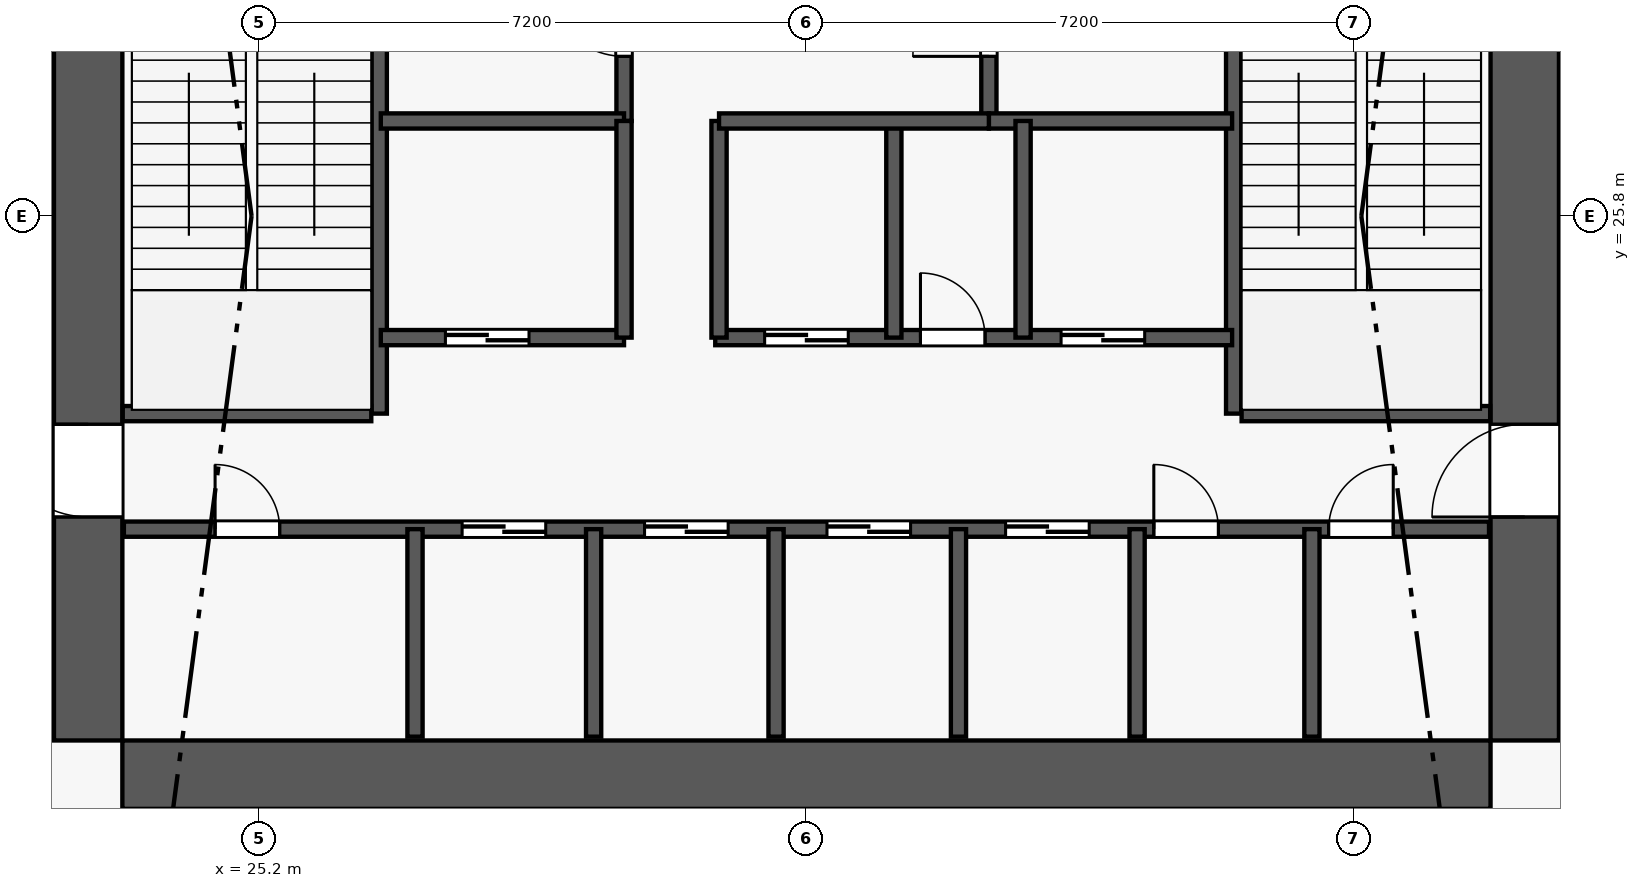
"""IFC4 building model, lengths in metres.
Left out: names, types, materials, properties, quantities, classifications, styles, units other than length and angle.
Written with IfcOpenShell. Run it as: python <this file> out.ifc"""

import sys

from ifc_helpers import new_model, si_unit, direction, frame, frame_2d, origin, origin_2d, place, context, subcontext, project, spatial, rectangle, extrude, element, fill, save


model = new_model("IFC4")
c1 = context("Model", 3, precision=1e-05, world=origin(), true_north=direction((0.0, 1.0)))
c2 = subcontext(c1, "Body", "Model", "MODEL_VIEW")
j1 = project(units=[si_unit("LENGTHUNIT", "METRE"), si_unit("PLANEANGLEUNIT", "RADIAN")], contexts=[c1])
p1 = place(None, origin())
s1 = spatial("IfcSite", under=j1, at=p1, CompositionType="ELEMENT")
p2 = place(p1, origin())
s2 = spatial("IfcBuilding", under=s1, at=p2, CompositionType="ELEMENT")
p3 = place(p2, frame((0.0, 0.0, -4.8)))
s3 = spatial("IfcBuildingStorey", under=s2, at=p3, CompositionType="ELEMENT", Elevation=-4.8)
for number, where, z_axis, x_axis in (
    (1, (22.95, 18.45, 0.0), (0.0, 0.0, 1.0), (1.0, 0.0, 0.0)),
    (2, (41.85, 18.45, 0.0), (0.0, 0.0, 1.0), (1.0, 0.0, 0.0)),
):
    element("IfcColumn", number, at=place(p3, frame(where, z_axis=z_axis, x_axis=x_axis)), inside=s3, PredefinedType="COLUMN", context=c2, shape_type="SweptSolid", body=[
        extrude(rectangle(XDim=0.9, YDim=0.9, at=origin_2d()), origin(), (0.0, 0.0, 1.0), 4.8),
    ])
p4 = place(p3, frame((23.4, 18.45, 0.0), z_axis=(0.0, 0.0, 1.0), x_axis=(1.0, 0.0, 0.0)))
e3 = element("IfcWall", 3, at=p4, inside=s3, PredefinedType="SHEAR", context=c2, shape_type="SweptSolid", body=[
    extrude(rectangle(XDim=18.0, YDim=0.9, at=frame_2d((9.0, 0.0))), origin(), (0.0, 0.0, 1.0), 4.55),
])
p5 = place(p3, frame((22.95, 18.9, 0.0), z_axis=(0.0, 0.0, 1.0), x_axis=(0.0, 1.0, 0.0)))
e4 = element("IfcWall", 4, at=p5, inside=s3, PredefinedType="SHEAR", context=c2, shape_type="SweptSolid", body=[
    extrude(rectangle(XDim=14.0, YDim=0.9, at=frame_2d((7.0, 0.0))), origin(), (0.0, 0.0, 1.0), 4.55),
])
p6 = place(p5, frame((2.94, 0.0, 0.0)))
e5 = element("IfcOpeningElement", 5, at=p6, cuts=e4, PredefinedType="OPENING", context=c2, shape_type="SweptSolid", body=[
    extrude(rectangle(XDim=1.22, YDim=2.25, at=frame_2d((0.61, 1.125))), frame((0.0, 0.46, 0.0), z_axis=(0.0, -1.0, 0.0), x_axis=(1.0, 0.0, 0.0)), (0.0, 0.0, 1.0), 0.92),
])
p7 = place(p3, frame((41.85, 18.9, 0.0), z_axis=(0.0, 0.0, 1.0), x_axis=(0.0, 1.0, 0.0)))
e6 = element("IfcWall", 6, at=p7, inside=s3, PredefinedType="SHEAR", context=c2, shape_type="SweptSolid", body=[
    extrude(rectangle(XDim=14.0, YDim=0.9, at=frame_2d((7.0, 0.0))), origin(), (0.0, 0.0, 1.0), 4.55),
])
p8 = place(p7, frame((2.94, 0.0, 0.0)))
e7 = element("IfcOpeningElement", 7, at=p8, cuts=e6, PredefinedType="OPENING", context=c2, shape_type="SweptSolid", body=[
    extrude(rectangle(XDim=1.22, YDim=2.25, at=frame_2d((0.61, 1.125))), frame((0.0, 0.46, 0.0), z_axis=(0.0, -1.0, 0.0), x_axis=(1.0, 0.0, 0.0)), (0.0, 0.0, 1.0), 0.92),
])
p9 = place(p3, frame((26.78, 23.2, 0.0), z_axis=(0.0, 0.0, 1.0), x_axis=(0.0, 1.0, 0.0)))
e8 = element("IfcWall", 8, at=p9, inside=s3, PredefinedType="SHEAR", context=c2, shape_type="SweptSolid", body=[
    extrude(rectangle(XDim=6.78, YDim=0.2, at=frame_2d((3.39, 0.0))), origin(), (0.0, 0.0, 1.0), 4.8),
])
p10 = place(p9, frame((5.32, 0.0, 0.0)))
e9 = element("IfcOpeningElement", 9, at=p10, cuts=e8, PredefinedType="OPENING", context=c2, shape_type="SweptSolid", body=[
    extrude(rectangle(XDim=1.05, YDim=2.15, at=frame_2d((0.525, 1.075))), frame((0.0, 0.11, 0.0), z_axis=(0.0, -1.0, 0.0), x_axis=(1.0, 0.0, 0.0)), (0.0, 0.0, 1.0), 0.22),
])
p11 = place(p3, frame((23.405, 23.2, 0.0), z_axis=(0.0, 0.0, 1.0), x_axis=(1.0, 0.0, 0.0)))
e10 = element("IfcWall", 10, at=p11, inside=s3, PredefinedType="PLUMBINGWALL", context=c2, shape_type="SweptSolid", body=[
    extrude(rectangle(XDim=3.27, YDim=0.2, at=frame_2d((1.635, 0.0))), origin(), (0.0, 0.0, 1.0), 4.55),
])
p12 = place(p3, frame((38.02, 23.2, 0.0), z_axis=(0.0, 0.0, 1.0), x_axis=(0.0, 1.0, 0.0)))
e11 = element("IfcWall", 11, at=p12, inside=s3, PredefinedType="SHEAR", context=c2, shape_type="SweptSolid", body=[
    extrude(rectangle(XDim=6.78, YDim=0.2, at=frame_2d((3.39, 0.0))), origin(), (0.0, 0.0, 1.0), 4.8),
])
p13 = place(p12, frame((5.32, 0.0, 0.0)))
e12 = element("IfcOpeningElement", 12, at=p13, cuts=e11, PredefinedType="OPENING", context=c2, shape_type="SweptSolid", body=[
    extrude(rectangle(XDim=1.05, YDim=2.15, at=frame_2d((0.525, 1.075))), frame((0.0, 0.11, 0.0), z_axis=(0.0, -1.0, 0.0), x_axis=(1.0, 0.0, 0.0)), (0.0, 0.0, 1.0), 0.22),
])
p14 = place(p3, frame((38.125, 23.2, 0.0), z_axis=(0.0, 0.0, 1.0), x_axis=(1.0, 0.0, 0.0)))
e13 = element("IfcWall", 13, at=p14, inside=s3, PredefinedType="PLUMBINGWALL", context=c2, shape_type="SweptSolid", body=[
    extrude(rectangle(XDim=3.27, YDim=0.2, at=frame_2d((1.635, 0.0))), origin(), (0.0, 0.0, 1.0), 4.55),
])
p15 = place(p3, frame((30.0, 27.05, 0.0), z_axis=(0.0, 0.0, 1.0), x_axis=(0.0, 1.0, 0.0)))
e14 = element("IfcWall", 14, at=p15, inside=s3, PredefinedType="PLUMBINGWALL", context=c2, shape_type="SweptSolid", body=[
    extrude(rectangle(XDim=2.75, YDim=0.2, at=frame_2d((1.375, 0.0))), origin(), (0.0, 0.0, 1.0), 4.55),
])
p16 = place(p15, frame((0.85, 0.0, 0.0)))
e15 = element("IfcOpeningElement", 15, at=p16, cuts=e14, PredefinedType="OPENING", context=c2, shape_type="SweptSolid", body=[
    extrude(rectangle(XDim=1.0, YDim=2.15, at=frame_2d((0.5, 1.075))), frame((0.0, 0.11, 0.0), z_axis=(0.0, -1.0, 0.0), x_axis=(1.0, 0.0, 0.0)), (0.0, 0.0, 1.0), 0.22),
])
p17 = place(p3, frame((26.8, 27.05, 0.0), z_axis=(0.0, 0.0, 1.0), x_axis=(1.0, 0.0, 0.0)))
e16 = element("IfcWall", 16, at=p17, inside=s3, PredefinedType="PLUMBINGWALL", context=c2, shape_type="SweptSolid", body=[
    extrude(rectangle(XDim=3.2, YDim=0.2, at=frame_2d((1.6, 0.0))), origin(), (0.0, 0.0, 1.0), 4.55),
])
p18 = place(p3, frame((34.8, 27.05, 0.0), z_axis=(0.0, 0.0, 1.0), x_axis=(0.0, 1.0, 0.0)))
e17 = element("IfcWall", 17, at=p18, inside=s3, PredefinedType="PLUMBINGWALL", context=c2, shape_type="SweptSolid", body=[
    extrude(rectangle(XDim=2.75, YDim=0.2, at=frame_2d((1.375, 0.0))), origin(), (0.0, 0.0, 1.0), 4.55),
])
p19 = place(p18, frame((0.85, 0.0, 0.0)))
e18 = element("IfcOpeningElement", 18, at=p19, cuts=e17, PredefinedType="OPENING", context=c2, shape_type="SweptSolid", body=[
    extrude(rectangle(XDim=1.0, YDim=2.15, at=frame_2d((0.5, 1.075))), frame((0.0, 0.11, 0.0), z_axis=(0.0, -1.0, 0.0), x_axis=(1.0, 0.0, 0.0)), (0.0, 0.0, 1.0), 0.22),
])
p20 = place(p3, frame((34.8, 27.05, 0.0), z_axis=(0.0, 0.0, 1.0), x_axis=(1.0, 0.0, 0.0)))
e19 = element("IfcWall", 19, at=p20, inside=s3, PredefinedType="PLUMBINGWALL", context=c2, shape_type="SweptSolid", body=[
    extrude(rectangle(XDim=3.2, YDim=0.2, at=frame_2d((1.6, 0.0))), origin(), (0.0, 0.0, 1.0), 4.55),
])
p21 = place(p3, frame((26.8, 24.2, 0.0), z_axis=(0.0, 0.0, 1.0), x_axis=(1.0, 0.0, 0.0)))
e20 = element("IfcWall", 20, at=p21, inside=s3, PredefinedType="PLUMBINGWALL", context=c2, shape_type="SweptSolid", body=[
    extrude(rectangle(XDim=3.2, YDim=0.2, at=frame_2d((1.6, 0.0))), origin(), (0.0, 0.0, 1.0), 4.55),
])
p22 = place(p21, frame((0.85, 0.0, 0.0)))
e21 = element("IfcOpeningElement", 21, at=p22, cuts=e20, PredefinedType="OPENING", context=c2, shape_type="SweptSolid", body=[
    extrude(rectangle(XDim=1.1, YDim=2.2, at=frame_2d((0.55, 1.1))), frame((0.0, 0.11, 0.0), z_axis=(0.0, -1.0, 0.0), x_axis=(1.0, 0.0, 0.0)), (0.0, 0.0, 1.0), 0.22),
])
p23 = place(p3, frame((30.0, 24.2, 0.0), z_axis=(0.0, 0.0, 1.0), x_axis=(0.0, 1.0, 0.0)))
e22 = element("IfcWall", 22, at=p23, inside=s3, PredefinedType="PLUMBINGWALL", context=c2, shape_type="SweptSolid", body=[
    extrude(rectangle(XDim=2.85, YDim=0.2, at=frame_2d((1.425, 0.0))), origin(), (0.0, 0.0, 1.0), 4.55),
])
p24 = place(p3, frame((31.2, 24.2, 0.0), z_axis=(0.0, 0.0, 1.0), x_axis=(1.0, 0.0, 0.0)))
e23 = element("IfcWall", 23, at=p24, inside=s3, PredefinedType="PLUMBINGWALL", context=c2, shape_type="SweptSolid", body=[
    extrude(rectangle(XDim=6.8, YDim=0.2, at=frame_2d((3.4, 0.0))), origin(), (0.0, 0.0, 1.0), 4.55),
])
p25 = place(p24, frame((0.65, 0.0, 0.0)))
e24 = element("IfcOpeningElement", 24, at=p25, cuts=e23, PredefinedType="OPENING", context=c2, shape_type="SweptSolid", body=[
    extrude(rectangle(XDim=1.1, YDim=2.2, at=frame_2d((0.55, 1.1))), frame((0.0, 0.11, 0.0), z_axis=(0.0, -1.0, 0.0), x_axis=(1.0, 0.0, 0.0)), (0.0, 0.0, 1.0), 0.22),
])
p26 = place(p24, frame((2.7, 0.0, 0.0)))
e25 = element("IfcOpeningElement", 25, at=p26, cuts=e23, PredefinedType="OPENING", context=c2, shape_type="SweptSolid", body=[
    extrude(rectangle(XDim=0.85, YDim=2.05, at=frame_2d((0.425, 1.025))), frame((0.0, 0.11, 0.0), z_axis=(0.0, -1.0, 0.0), x_axis=(1.0, 0.0, 0.0)), (0.0, 0.0, 1.0), 0.22),
])
p27 = place(p24, frame((4.55, 0.0, 0.0)))
e26 = element("IfcOpeningElement", 26, at=p27, cuts=e23, PredefinedType="OPENING", context=c2, shape_type="SweptSolid", body=[
    extrude(rectangle(XDim=1.1, YDim=2.2, at=frame_2d((0.55, 1.1))), frame((0.0, 0.11, 0.0), z_axis=(0.0, -1.0, 0.0), x_axis=(1.0, 0.0, 0.0)), (0.0, 0.0, 1.0), 0.22),
])
for number, where, z_axis, x_axis in (
    (27, (31.25, 24.2, 0.0), (0.0, 0.0, 1.0), (0.0, 1.0, 0.0)),
    (28, (33.55, 24.2, 0.0), (0.0, 0.0, 1.0), (0.0, 1.0, 0.0)),
    (29, (35.25, 24.2, 0.0), (0.0, 0.0, 1.0), (0.0, 1.0, 0.0)),
):
    element("IfcWall", number, at=place(p3, frame(where, z_axis=z_axis, x_axis=x_axis)), inside=s3, PredefinedType="PLUMBINGWALL", context=c2, shape_type="SweptSolid", body=[
        extrude(rectangle(XDim=2.85, YDim=0.2, at=frame_2d((1.425, 0.0))), origin(), (0.0, 0.0, 1.0), 4.55),
    ])
p28 = place(p3, frame((31.25, 27.05, 0.0), z_axis=(0.0, 0.0, 1.0), x_axis=(1.0, 0.0, 0.0)))
e30 = element("IfcWall", 30, at=p28, inside=s3, PredefinedType="PLUMBINGWALL", context=c2, shape_type="SweptSolid", body=[
    extrude(rectangle(XDim=3.55, YDim=0.2, at=frame_2d((1.775, 0.0))), origin(), (0.0, 0.0, 1.0), 4.55),
])
p29 = place(p3, frame((23.42, 21.68, 0.0), z_axis=(0.0, 0.0, 1.0), x_axis=(1.0, 0.0, 0.0)))
e31 = element("IfcWall", 31, at=p29, inside=s3, PredefinedType="PLUMBINGWALL", context=c2, shape_type="SweptSolid", body=[
    extrude(rectangle(XDim=17.96, YDim=0.2, at=frame_2d((8.98, 0.0))), origin(), (0.0, 0.0, 1.0), 4.55),
])
p30 = place(p29, frame((4.45, 0.0, 0.0)))
e32 = element("IfcOpeningElement", 32, at=p30, cuts=e31, PredefinedType="OPENING", context=c2, shape_type="SweptSolid", body=[
    extrude(rectangle(XDim=1.1, YDim=2.2, at=frame_2d((0.55, 1.1))), frame((0.0, 0.11, 0.0), z_axis=(0.0, -1.0, 0.0), x_axis=(1.0, 0.0, 0.0)), (0.0, 0.0, 1.0), 0.22),
])
p31 = place(p29, frame((6.85, 0.0, 0.0)))
e33 = element("IfcOpeningElement", 33, at=p31, cuts=e31, PredefinedType="OPENING", context=c2, shape_type="SweptSolid", body=[
    extrude(rectangle(XDim=1.1, YDim=2.2, at=frame_2d((0.55, 1.1))), frame((0.0, 0.11, 0.0), z_axis=(0.0, -1.0, 0.0), x_axis=(1.0, 0.0, 0.0)), (0.0, 0.0, 1.0), 0.22),
])
p32 = place(p29, frame((9.25, 0.0, 0.0)))
e34 = element("IfcOpeningElement", 34, at=p32, cuts=e31, PredefinedType="OPENING", context=c2, shape_type="SweptSolid", body=[
    extrude(rectangle(XDim=1.1, YDim=2.2, at=frame_2d((0.55, 1.1))), frame((0.0, 0.11, 0.0), z_axis=(0.0, -1.0, 0.0), x_axis=(1.0, 0.0, 0.0)), (0.0, 0.0, 1.0), 0.22),
])
p33 = place(p29, frame((11.6, 0.0, 0.0)))
e35 = element("IfcOpeningElement", 35, at=p33, cuts=e31, PredefinedType="OPENING", context=c2, shape_type="SweptSolid", body=[
    extrude(rectangle(XDim=1.1, YDim=2.2, at=frame_2d((0.55, 1.1))), frame((0.0, 0.11, 0.0), z_axis=(0.0, -1.0, 0.0), x_axis=(1.0, 0.0, 0.0)), (0.0, 0.0, 1.0), 0.22),
])
p34 = place(p29, frame((1.2, 0.0, 0.0)))
e36 = element("IfcOpeningElement", 36, at=p34, cuts=e31, PredefinedType="OPENING", context=c2, shape_type="SweptSolid", body=[
    extrude(rectangle(XDim=0.85, YDim=2.05, at=frame_2d((0.425, 1.025))), frame((0.0, 0.11, 0.0), z_axis=(0.0, -1.0, 0.0), x_axis=(1.0, 0.0, 0.0)), (0.0, 0.0, 1.0), 0.22),
])
p35 = place(p29, frame((13.55, 0.0, 0.0)))
e37 = element("IfcOpeningElement", 37, at=p35, cuts=e31, PredefinedType="OPENING", context=c2, shape_type="SweptSolid", body=[
    extrude(rectangle(XDim=0.85, YDim=2.05, at=frame_2d((0.425, 1.025))), frame((0.0, 0.11, 0.0), z_axis=(0.0, -1.0, 0.0), x_axis=(1.0, 0.0, 0.0)), (0.0, 0.0, 1.0), 0.22),
])
p36 = place(p29, frame((15.85, 0.0, 0.0)))
e38 = element("IfcOpeningElement", 38, at=p36, cuts=e31, PredefinedType="OPENING", context=c2, shape_type="SweptSolid", body=[
    extrude(rectangle(XDim=0.85, YDim=2.05, at=frame_2d((0.425, 1.025))), frame((0.0, 0.11, 0.0), z_axis=(0.0, -1.0, 0.0), x_axis=(1.0, 0.0, 0.0)), (0.0, 0.0, 1.0), 0.22),
])
for number, where, z_axis, x_axis in (
    (39, (27.25, 18.95, 0.0), (0.0, 0.0, 1.0), (0.0, 1.0, 0.0)),
    (40, (29.6, 18.95, 0.0), (0.0, 0.0, 1.0), (0.0, 1.0, 0.0)),
    (41, (32.0, 18.95, 0.0), (0.0, 0.0, 1.0), (0.0, 1.0, 0.0)),
    (42, (34.4, 18.95, 0.0), (0.0, 0.0, 1.0), (0.0, 1.0, 0.0)),
    (43, (36.75, 18.95, 0.0), (0.0, 0.0, 1.0), (0.0, 1.0, 0.0)),
    (44, (39.05, 18.95, 0.0), (0.0, 0.0, 1.0), (0.0, 1.0, 0.0)),
):
    element("IfcWall", number, at=place(p3, frame(where, z_axis=z_axis, x_axis=x_axis)), inside=s3, PredefinedType="PLUMBINGWALL", context=c2, shape_type="SweptSolid", body=[
        extrude(rectangle(XDim=2.73, YDim=0.2, at=frame_2d((1.365, 0.0))), origin(), (0.0, 0.0, 1.0), 4.55),
    ])
p37 = place(p6, origin())
e45 = element("IfcDoor", 45, at=p37, inside=s3, OperationType="SINGLE_SWING_RIGHT", PredefinedType="DOOR", context=c2, shape_type="SweptSolid", body=[
    extrude(rectangle(XDim=1.22, YDim=2.25, at=frame_2d((0.61, 1.125))), frame((0.0, 0.025, 0.0), z_axis=(0.0, -1.0, 0.0), x_axis=(1.0, 0.0, 0.0)), (0.0, 0.0, 1.0), 0.05),
])
fill(e5, e45)
p38 = place(p8, origin())
e46 = element("IfcDoor", 46, at=p38, inside=s3, OperationType="SINGLE_SWING_LEFT", PredefinedType="DOOR", context=c2, shape_type="SweptSolid", body=[
    extrude(rectangle(XDim=1.22, YDim=2.25, at=frame_2d((0.61, 1.125))), frame((0.0, 0.025, 0.0), z_axis=(0.0, -1.0, 0.0), x_axis=(1.0, 0.0, 0.0)), (0.0, 0.0, 1.0), 0.05),
])
fill(e7, e46)
p39 = place(p16, origin())
e47 = element("IfcDoor", 47, at=p39, inside=s3, OperationType="SINGLE_SWING_RIGHT", PredefinedType="DOOR", context=c2, shape_type="SweptSolid", body=[
    extrude(rectangle(XDim=1.0, YDim=2.15, at=frame_2d((0.5, 1.075))), frame((0.0, 0.025, 0.0), z_axis=(0.0, -1.0, 0.0), x_axis=(1.0, 0.0, 0.0)), (0.0, 0.0, 1.0), 0.05),
])
fill(e15, e47)
p40 = place(p19, origin())
e48 = element("IfcDoor", 48, at=p40, inside=s3, OperationType="SINGLE_SWING_LEFT", PredefinedType="DOOR", context=c2, shape_type="SweptSolid", body=[
    extrude(rectangle(XDim=1.0, YDim=2.15, at=frame_2d((0.5, 1.075))), frame((0.0, 0.025, 0.0), z_axis=(0.0, -1.0, 0.0), x_axis=(1.0, 0.0, 0.0)), (0.0, 0.0, 1.0), 0.05),
])
fill(e18, e48)
p41 = place(p22, origin())
e49 = element("IfcDoor", 49, at=p41, inside=s3, OperationType="DOUBLE_DOOR_SLIDING", PredefinedType="DOOR", context=c2, shape_type="SweptSolid", body=[
    extrude(rectangle(XDim=1.1, YDim=2.2, at=frame_2d((0.55, 1.1))), frame((0.0, 0.025, 0.0), z_axis=(0.0, -1.0, 0.0), x_axis=(1.0, 0.0, 0.0)), (0.0, 0.0, 1.0), 0.05),
])
fill(e21, e49)
p42 = place(p25, origin())
e50 = element("IfcDoor", 50, at=p42, inside=s3, OperationType="DOUBLE_DOOR_SLIDING", PredefinedType="DOOR", context=c2, shape_type="SweptSolid", body=[
    extrude(rectangle(XDim=1.1, YDim=2.2, at=frame_2d((0.55, 1.1))), frame((0.0, 0.025, 0.0), z_axis=(0.0, -1.0, 0.0), x_axis=(1.0, 0.0, 0.0)), (0.0, 0.0, 1.0), 0.05),
])
fill(e24, e50)
p43 = place(p26, origin())
e51 = element("IfcDoor", 51, at=p43, inside=s3, OperationType="SINGLE_SWING_LEFT", PredefinedType="DOOR", context=c2, shape_type="SweptSolid", body=[
    extrude(rectangle(XDim=0.85, YDim=2.05, at=frame_2d((0.425, 1.025))), frame((0.0, 0.025, 0.0), z_axis=(0.0, -1.0, 0.0), x_axis=(1.0, 0.0, 0.0)), (0.0, 0.0, 1.0), 0.05),
])
fill(e25, e51)
p44 = place(p27, origin())
e52 = element("IfcDoor", 52, at=p44, inside=s3, OperationType="DOUBLE_DOOR_SLIDING", PredefinedType="DOOR", context=c2, shape_type="SweptSolid", body=[
    extrude(rectangle(XDim=1.1, YDim=2.2, at=frame_2d((0.55, 1.1))), frame((0.0, 0.025, 0.0), z_axis=(0.0, -1.0, 0.0), x_axis=(1.0, 0.0, 0.0)), (0.0, 0.0, 1.0), 0.05),
])
fill(e26, e52)
p45 = place(p30, origin())
e53 = element("IfcDoor", 53, at=p45, inside=s3, OperationType="DOUBLE_DOOR_SLIDING", PredefinedType="DOOR", context=c2, shape_type="SweptSolid", body=[
    extrude(rectangle(XDim=1.1, YDim=2.2, at=frame_2d((0.55, 1.1))), frame((0.0, 0.025, 0.0), z_axis=(0.0, -1.0, 0.0), x_axis=(1.0, 0.0, 0.0)), (0.0, 0.0, 1.0), 0.05),
])
fill(e32, e53)
p46 = place(p31, origin())
e54 = element("IfcDoor", 54, at=p46, inside=s3, OperationType="DOUBLE_DOOR_SLIDING", PredefinedType="DOOR", context=c2, shape_type="SweptSolid", body=[
    extrude(rectangle(XDim=1.1, YDim=2.2, at=frame_2d((0.55, 1.1))), frame((0.0, 0.025, 0.0), z_axis=(0.0, -1.0, 0.0), x_axis=(1.0, 0.0, 0.0)), (0.0, 0.0, 1.0), 0.05),
])
fill(e33, e54)
p47 = place(p32, origin())
e55 = element("IfcDoor", 55, at=p47, inside=s3, OperationType="DOUBLE_DOOR_SLIDING", PredefinedType="DOOR", context=c2, shape_type="SweptSolid", body=[
    extrude(rectangle(XDim=1.1, YDim=2.2, at=frame_2d((0.55, 1.1))), frame((0.0, 0.025, 0.0), z_axis=(0.0, -1.0, 0.0), x_axis=(1.0, 0.0, 0.0)), (0.0, 0.0, 1.0), 0.05),
])
fill(e34, e55)
p48 = place(p33, origin())
e56 = element("IfcDoor", 56, at=p48, inside=s3, OperationType="DOUBLE_DOOR_SLIDING", PredefinedType="DOOR", context=c2, shape_type="SweptSolid", body=[
    extrude(rectangle(XDim=1.1, YDim=2.2, at=frame_2d((0.55, 1.1))), frame((0.0, 0.025, 0.0), z_axis=(0.0, -1.0, 0.0), x_axis=(1.0, 0.0, 0.0)), (0.0, 0.0, 1.0), 0.05),
])
fill(e35, e56)
p49 = place(p34, origin())
e57 = element("IfcDoor", 57, at=p49, inside=s3, OperationType="SINGLE_SWING_LEFT", PredefinedType="DOOR", context=c2, shape_type="SweptSolid", body=[
    extrude(rectangle(XDim=0.85, YDim=2.05, at=frame_2d((0.425, 1.025))), frame((0.0, 0.025, 0.0), z_axis=(0.0, -1.0, 0.0), x_axis=(1.0, 0.0, 0.0)), (0.0, 0.0, 1.0), 0.05),
])
fill(e36, e57)
p50 = place(p35, origin())
e58 = element("IfcDoor", 58, at=p50, inside=s3, OperationType="SINGLE_SWING_LEFT", PredefinedType="DOOR", context=c2, shape_type="SweptSolid", body=[
    extrude(rectangle(XDim=0.85, YDim=2.05, at=frame_2d((0.425, 1.025))), frame((0.0, 0.025, 0.0), z_axis=(0.0, -1.0, 0.0), x_axis=(1.0, 0.0, 0.0)), (0.0, 0.0, 1.0), 0.05),
])
fill(e37, e58)
p51 = place(p36, origin())
e59 = element("IfcDoor", 59, at=p51, inside=s3, OperationType="SINGLE_SWING_RIGHT", PredefinedType="DOOR", context=c2, shape_type="SweptSolid", body=[
    extrude(rectangle(XDim=0.85, YDim=2.05, at=frame_2d((0.425, 1.025))), frame((0.0, 0.025, 0.0), z_axis=(0.0, -1.0, 0.0), x_axis=(1.0, 0.0, 0.0)), (0.0, 0.0, 1.0), 0.05),
])
fill(e38, e59)
save(model, sys.argv[1])
